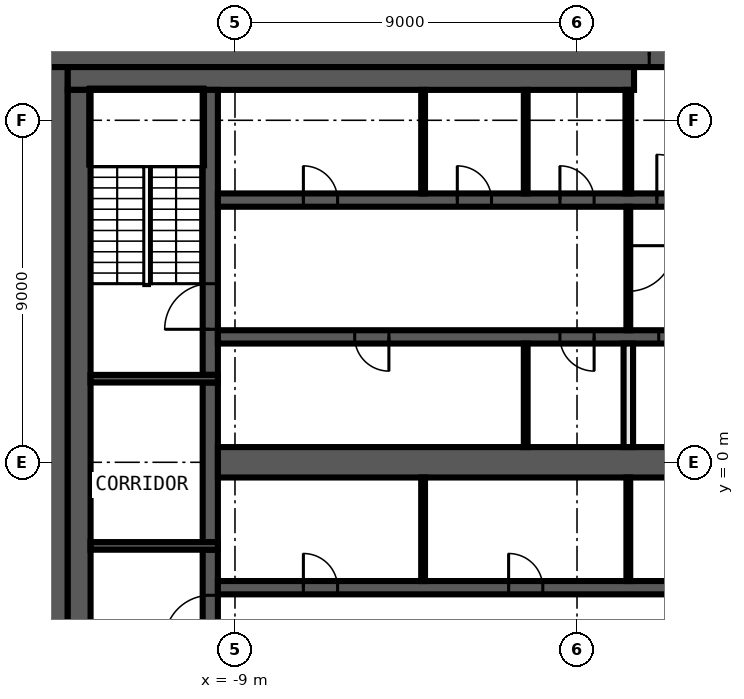
"""IFC4 building model, lengths in metres.
Left out: names, types, materials, properties, quantities, classifications, styles, units other than length and angle.
Written with IfcOpenShell. Run it as: python <this file> out.ifc"""

import sys

from ifc_helpers import new_model, si_unit, direction, frame, frame_2d, origin, place, context, subcontext, project, spatial, rectangle, extrude, element, fill, save


model = new_model("IFC4")
c1 = context("Model", 3, precision=1e-05, world=origin(), true_north=direction((0.0, 1.0)))
c2 = subcontext(c1, "Body", "Model", "MODEL_VIEW")
j1 = project(units=[si_unit("LENGTHUNIT", "METRE"), si_unit("PLANEANGLEUNIT", "RADIAN")], contexts=[c1])
p1 = place(None, origin())
s1 = spatial("IfcSite", under=j1, at=p1, CompositionType="ELEMENT")
p2 = place(p1, origin())
s2 = spatial("IfcBuilding", under=s1, at=p2, CompositionType="ELEMENT")
p3 = place(p2, frame((0.0, 0.0, 327.8)))
s3 = spatial("IfcBuildingStorey", under=s2, at=p3, CompositionType="ELEMENT", Elevation=327.8)
p4 = place(p3, frame((-14.0, 10.7, 0.0), z_axis=(0.0, 0.0, 1.0), x_axis=(1.0, 0.0, 0.0)))
e1 = element("IfcWall", 1, at=p4, inside=s3, PredefinedType="SHEAR", context=c2, shape_type="SweptSolid", body=[
    extrude(rectangle(XDim=28.0, YDim=0.6, at=frame_2d((14.0, 0.0))), origin(), (0.0, 0.0, 1.0), 3.82),
])
p5 = place(p4, frame((15.9, 0.0, 0.0)))
e2 = element("IfcOpeningElement", 2, at=p5, cuts=e1, PredefinedType="OPENING", context=c2, shape_type="SweptSolid", body=[
    extrude(rectangle(XDim=1.6, YDim=2.1, at=frame_2d((0.8, 1.05))), frame((0.0, 0.31, 0.0), z_axis=(0.0, -1.0, 0.0), x_axis=(1.0, 0.0, 0.0)), (0.0, 0.0, 1.0), 0.62),
])
p6 = place(p3, frame((-13.7, -10.4, 0.0), z_axis=(0.0, 0.0, 1.0), x_axis=(0.0, 1.0, 0.0)))
e3 = element("IfcWall", 3, at=p6, inside=s3, PredefinedType="SHEAR", context=c2, shape_type="SweptSolid", body=[
    extrude(rectangle(XDim=20.8, YDim=0.6, at=frame_2d((10.4, 0.0))), origin(), (0.0, 0.0, 1.0), 3.82),
])
p7 = place(p3, frame((-13.4, 10.1, 0.0), z_axis=(0.0, 0.0, 1.0), x_axis=(1.0, 0.0, 0.0)))
e4 = element("IfcWall", 4, at=p7, inside=s3, PredefinedType="SHEAR", context=c2, shape_type="SweptSolid", body=[
    extrude(rectangle(XDim=14.9, YDim=0.6, at=frame_2d((7.45, 0.0))), origin(), (0.0, 0.0, 1.0), 3.82),
])
p8 = place(p3, frame((-13.1, -9.8, 0.0), z_axis=(0.0, 0.0, 1.0), x_axis=(0.0, 1.0, 0.0)))
e5 = element("IfcWall", 5, at=p8, inside=s3, PredefinedType="SHEAR", context=c2, shape_type="SweptSolid", body=[
    extrude(rectangle(XDim=19.6, YDim=0.6, at=frame_2d((9.8, 0.0))), origin(), (0.0, 0.0, 1.0), 3.82),
])
p9 = place(p3, frame((-9.65, -9.8, 0.0), z_axis=(0.0, 0.0, 1.0), x_axis=(0.0, 1.0, 0.0)))
e6 = element("IfcWall", 6, at=p9, inside=s3, PredefinedType="SHEAR", context=c2, shape_type="SweptSolid", body=[
    extrude(rectangle(XDim=7.5, YDim=0.4, at=frame_2d((3.75, 0.0))), origin(), (0.0, 0.0, 1.0), 3.82),
])
p10 = place(p9, frame((5.1, 0.0, 0.0)))
e7 = element("IfcOpeningElement", 7, at=p10, cuts=e6, PredefinedType="OPENING", context=c2, shape_type="SweptSolid", body=[
    extrude(rectangle(XDim=1.2, YDim=2.1, at=frame_2d((0.6, 1.05))), frame((0.0, 0.21, 0.0), z_axis=(0.0, -1.0, 0.0), x_axis=(1.0, 0.0, 0.0)), (0.0, 0.0, 1.0), 0.42),
])
p11 = place(p3, frame((-9.65, -2.1, 0.0), z_axis=(0.0, 0.0, 1.0), x_axis=(0.0, 1.0, 0.0)))
e8 = element("IfcWall", 8, at=p11, inside=s3, PredefinedType="SHEAR", context=c2, shape_type="SweptSolid", body=[
    extrude(rectangle(XDim=4.2, YDim=0.4, at=frame_2d((2.1, 0.0))), origin(), (0.0, 0.0, 1.0), 3.82),
])
p12 = place(p3, frame((-9.65, 2.3, 0.0), z_axis=(0.0, 0.0, 1.0), x_axis=(0.0, 1.0, 0.0)))
e9 = element("IfcWall", 9, at=p12, inside=s3, PredefinedType="SHEAR", context=c2, shape_type="SweptSolid", body=[
    extrude(rectangle(XDim=7.5, YDim=0.4, at=frame_2d((3.75, 0.0))), origin(), (0.0, 0.0, 1.0), 3.82),
])
p13 = place(p12, frame((1.2, 0.0, 0.0)))
e10 = element("IfcOpeningElement", 10, at=p13, cuts=e9, PredefinedType="OPENING", context=c2, shape_type="SweptSolid", body=[
    extrude(rectangle(XDim=1.2, YDim=2.1, at=frame_2d((0.6, 1.05))), frame((0.0, 0.21, 0.0), z_axis=(0.0, -1.0, 0.0), x_axis=(1.0, 0.0, 0.0)), (0.0, 0.0, 1.0), 0.42),
])
for number, where, z_axis, x_axis in (
    (11, (-9.45, 2.2, 0.0), (0.0, 0.0, 1.0), (-1.0, 0.0, 0.0)),
    (12, (-9.45, -2.2, 0.0), (0.0, 0.0, 1.0), (-1.0, 0.0, 0.0)),
):
    element("IfcWall", number, at=place(p3, frame(where, z_axis=z_axis, x_axis=x_axis)), inside=s3, PredefinedType="SHEAR", context=c2, shape_type="SweptSolid", body=[
        extrude(rectangle(XDim=3.35, YDim=0.2, at=frame_2d((1.675, 0.0))), origin(), (0.0, 0.0, 1.0), 3.82),
    ])
p14 = place(p3, frame((-9.45, 6.9, 0.0), z_axis=(0.0, 0.0, 1.0), x_axis=(1.0, 0.0, 0.0)))
e13 = element("IfcWall", 13, at=p14, inside=s3, PredefinedType="SHEAR", context=c2, shape_type="SweptSolid", body=[
    extrude(rectangle(XDim=18.9, YDim=0.35, at=frame_2d((9.45, 0.0))), origin(), (0.0, 0.0, 1.0), 3.82),
])
p15 = place(p14, frame((11.55, 0.0, 0.0)))
e14 = element("IfcOpeningElement", 14, at=p15, cuts=e13, PredefinedType="OPENING", context=c2, shape_type="SweptSolid", body=[
    extrude(rectangle(XDim=1.2, YDim=2.1, at=frame_2d((0.6, 1.05))), frame((0.0, 0.185, 0.0), z_axis=(0.0, -1.0, 0.0), x_axis=(1.0, 0.0, 0.0)), (0.0, 0.0, 1.0), 0.37),
])
p16 = place(p14, frame((14.3, 0.0, 0.0)))
e15 = element("IfcOpeningElement", 15, at=p16, cuts=e13, PredefinedType="OPENING", context=c2, shape_type="SweptSolid", body=[
    extrude(rectangle(XDim=1.1, YDim=2.1, at=frame_2d((0.55, 1.05))), frame((0.0, 0.185, 0.0), z_axis=(0.0, -1.0, 0.0), x_axis=(1.0, 0.0, 0.0)), (0.0, 0.0, 1.0), 0.37),
])
p17 = place(p14, frame((17.0, 0.0, 0.0)))
e16 = element("IfcOpeningElement", 16, at=p17, cuts=e13, PredefinedType="OPENING", context=c2, shape_type="SweptSolid", body=[
    extrude(rectangle(XDim=1.1, YDim=2.1, at=frame_2d((0.55, 1.05))), frame((0.0, 0.185, 0.0), z_axis=(0.0, -1.0, 0.0), x_axis=(1.0, 0.0, 0.0)), (0.0, 0.0, 1.0), 0.37),
])
p18 = place(p14, frame((2.25, 0.0, 0.0)))
e17 = element("IfcOpeningElement", 17, at=p18, cuts=e13, PredefinedType="OPENING", context=c2, shape_type="SweptSolid", body=[
    extrude(rectangle(XDim=0.9, YDim=2.1, at=frame_2d((0.45, 1.05))), frame((0.0, 0.185, 0.0), z_axis=(0.0, -1.0, 0.0), x_axis=(1.0, 0.0, 0.0)), (0.0, 0.0, 1.0), 0.37),
])
p19 = place(p14, frame((6.3, 0.0, 0.0)))
e18 = element("IfcOpeningElement", 18, at=p19, cuts=e13, PredefinedType="OPENING", context=c2, shape_type="SweptSolid", body=[
    extrude(rectangle(XDim=0.9, YDim=2.1, at=frame_2d((0.45, 1.05))), frame((0.0, 0.185, 0.0), z_axis=(0.0, -1.0, 0.0), x_axis=(1.0, 0.0, 0.0)), (0.0, 0.0, 1.0), 0.37),
])
p20 = place(p14, frame((9.0, 0.0, 0.0)))
e19 = element("IfcOpeningElement", 19, at=p20, cuts=e13, PredefinedType="OPENING", context=c2, shape_type="SweptSolid", body=[
    extrude(rectangle(XDim=0.9, YDim=2.1, at=frame_2d((0.45, 1.05))), frame((0.0, 0.185, 0.0), z_axis=(0.0, -1.0, 0.0), x_axis=(1.0, 0.0, 0.0)), (0.0, 0.0, 1.0), 0.37),
])
p21 = place(p3, frame((9.45, 3.3, 0.0), z_axis=(0.0, 0.0, 1.0), x_axis=(-1.0, 0.0, 0.0)))
e20 = element("IfcWall", 20, at=p21, inside=s3, PredefinedType="SHEAR", context=c2, shape_type="SweptSolid", body=[
    extrude(rectangle(XDim=18.9, YDim=0.35, at=frame_2d((9.45, 0.0))), origin(), (0.0, 0.0, 1.0), 3.82),
])
p22 = place(p21, frame((6.2, 0.0, 0.0)))
e21 = element("IfcOpeningElement", 21, at=p22, cuts=e20, PredefinedType="OPENING", context=c2, shape_type="SweptSolid", body=[
    extrude(rectangle(XDim=1.1, YDim=2.1, at=frame_2d((0.55, 1.05))), frame((0.0, 0.185, 0.0), z_axis=(0.0, -1.0, 0.0), x_axis=(1.0, 0.0, 0.0)), (0.0, 0.0, 1.0), 0.37),
])
p23 = place(p21, frame((3.5, 0.0, 0.0)))
e22 = element("IfcOpeningElement", 22, at=p23, cuts=e20, PredefinedType="OPENING", context=c2, shape_type="SweptSolid", body=[
    extrude(rectangle(XDim=1.1, YDim=2.1, at=frame_2d((0.55, 1.05))), frame((0.0, 0.185, 0.0), z_axis=(0.0, -1.0, 0.0), x_axis=(1.0, 0.0, 0.0)), (0.0, 0.0, 1.0), 0.37),
])
p24 = place(p21, frame((0.9, 0.0, 0.0)))
e23 = element("IfcOpeningElement", 23, at=p24, cuts=e20, PredefinedType="OPENING", context=c2, shape_type="SweptSolid", body=[
    extrude(rectangle(XDim=0.9, YDim=2.1, at=frame_2d((0.45, 1.05))), frame((0.0, 0.185, 0.0), z_axis=(0.0, -1.0, 0.0), x_axis=(1.0, 0.0, 0.0)), (0.0, 0.0, 1.0), 0.37),
])
p25 = place(p21, frame((14.4, 0.0, 0.0)))
e24 = element("IfcOpeningElement", 24, at=p25, cuts=e20, PredefinedType="OPENING", context=c2, shape_type="SweptSolid", body=[
    extrude(rectangle(XDim=0.9, YDim=2.1, at=frame_2d((0.45, 1.05))), frame((0.0, 0.185, 0.0), z_axis=(0.0, -1.0, 0.0), x_axis=(1.0, 0.0, 0.0)), (0.0, 0.0, 1.0), 0.37),
])
p26 = place(p21, frame((9.0, 0.0, 0.0)))
e25 = element("IfcOpeningElement", 25, at=p26, cuts=e20, PredefinedType="OPENING", context=c2, shape_type="SweptSolid", body=[
    extrude(rectangle(XDim=0.9, YDim=2.1, at=frame_2d((0.45, 1.05))), frame((0.0, 0.185, 0.0), z_axis=(0.0, -1.0, 0.0), x_axis=(1.0, 0.0, 0.0)), (0.0, 0.0, 1.0), 0.37),
])
p27 = place(p3, frame((-9.45, -3.3, 0.0), z_axis=(0.0, 0.0, 1.0), x_axis=(1.0, 0.0, 0.0)))
e26 = element("IfcWall", 26, at=p27, inside=s3, PredefinedType="SHEAR", context=c2, shape_type="SweptSolid", body=[
    extrude(rectangle(XDim=18.9, YDim=0.35, at=frame_2d((9.45, 0.0))), origin(), (0.0, 0.0, 1.0), 3.82),
])
p28 = place(p27, frame((17.0, 0.0, 0.0)))
e27 = element("IfcOpeningElement", 27, at=p28, cuts=e26, PredefinedType="OPENING", context=c2, shape_type="SweptSolid", body=[
    extrude(rectangle(XDim=1.1, YDim=2.1, at=frame_2d((0.55, 1.05))), frame((0.0, 0.185, 0.0), z_axis=(0.0, -1.0, 0.0), x_axis=(1.0, 0.0, 0.0)), (0.0, 0.0, 1.0), 0.37),
])
p29 = place(p27, frame((2.25, 0.0, 0.0)))
e28 = element("IfcOpeningElement", 28, at=p29, cuts=e26, PredefinedType="OPENING", context=c2, shape_type="SweptSolid", body=[
    extrude(rectangle(XDim=0.9, YDim=2.1, at=frame_2d((0.45, 1.05))), frame((0.0, 0.185, 0.0), z_axis=(0.0, -1.0, 0.0), x_axis=(1.0, 0.0, 0.0)), (0.0, 0.0, 1.0), 0.37),
])
p30 = place(p27, frame((7.65, 0.0, 0.0)))
e29 = element("IfcOpeningElement", 29, at=p30, cuts=e26, PredefinedType="OPENING", context=c2, shape_type="SweptSolid", body=[
    extrude(rectangle(XDim=0.9, YDim=2.1, at=frame_2d((0.45, 1.05))), frame((0.0, 0.185, 0.0), z_axis=(0.0, -1.0, 0.0), x_axis=(1.0, 0.0, 0.0)), (0.0, 0.0, 1.0), 0.37),
])
p31 = place(p27, frame((13.05, 0.0, 0.0)))
e30 = element("IfcOpeningElement", 30, at=p31, cuts=e26, PredefinedType="OPENING", context=c2, shape_type="SweptSolid", body=[
    extrude(rectangle(XDim=0.9, YDim=2.1, at=frame_2d((0.45, 1.05))), frame((0.0, 0.185, 0.0), z_axis=(0.0, -1.0, 0.0), x_axis=(1.0, 0.0, 0.0)), (0.0, 0.0, 1.0), 0.37),
])
p32 = place(p3, frame((-9.45, 0.0, 0.0), z_axis=(0.0, 0.0, 1.0), x_axis=(1.0, 0.0, 0.0)))
e31 = element("IfcWall", 31, at=p32, inside=s3, PredefinedType="SHEAR", context=c2, shape_type="SweptSolid", body=[
    extrude(rectangle(XDim=18.9, YDim=0.8, at=frame_2d((9.45, 0.0))), origin(), (0.0, 0.0, 1.0), 3.82),
])
p33 = place(p3, frame((1.35, 7.075, 0.0), z_axis=(0.0, 0.0, 1.0), x_axis=(0.0, 1.0, 0.0)))
e32 = element("IfcWall", 32, at=p33, inside=s3, PredefinedType="PARTITIONING", context=c2, shape_type="SweptSolid", body=[
    extrude(rectangle(XDim=2.725, YDim=0.15, at=frame_2d((1.363, 0.0))), origin(), (0.0, 0.0, 1.0), 3.82),
])
p34 = place(p3, frame((1.35, -3.125, 0.0), z_axis=(0.0, 0.0, 1.0), x_axis=(0.0, 1.0, 0.0)))
e33 = element("IfcWall", 33, at=p34, inside=s3, PredefinedType="PARTITIONING", context=c2, shape_type="SweptSolid", body=[
    extrude(rectangle(XDim=2.725, YDim=0.1, at=frame_2d((1.363, 0.0))), origin(), (0.0, 0.0, 1.0), 3.82),
])
p35 = place(p3, frame((1.35, 6.725, 0.0), z_axis=(0.0, 0.0, 1.0), x_axis=(0.0, -1.0, 0.0)))
e34 = element("IfcWall", 34, at=p35, inside=s3, PredefinedType="PARTITIONING", context=c2, shape_type="SweptSolid", body=[
    extrude(rectangle(XDim=3.25, YDim=0.1, at=frame_2d((1.625, 0.0))), origin(), (0.0, 0.0, 1.0), 3.82),
])
p36 = place(p35, frame((1.025, 0.0, 0.0)))
e35 = element("IfcOpeningElement", 35, at=p36, cuts=e34, PredefinedType="OPENING", context=c2, shape_type="SweptSolid", body=[
    extrude(rectangle(XDim=1.2, YDim=2.1, at=frame_2d((0.6, 1.05))), frame((0.0, 0.06, 0.0), z_axis=(0.0, -1.0, 0.0), x_axis=(1.0, 0.0, 0.0)), (0.0, 0.0, 1.0), 0.12),
])
p37 = place(p3, frame((1.35, 0.4, 0.0), z_axis=(0.0, 0.0, 1.0), x_axis=(0.0, 1.0, 0.0)))
e36 = element("IfcWall", 36, at=p37, inside=s3, PredefinedType="SOLIDWALL", context=c2, shape_type="SweptSolid", body=[
    extrude(rectangle(XDim=2.725, YDim=0.25, at=frame_2d((1.363, 0.0))), origin(), (0.0, 0.0, 1.0), 3.82),
])
for number, where, z_axis, x_axis in (
    (37, (-1.35, 0.4, 0.0), (0.0, 0.0, 1.0), (0.0, 1.0, 0.0)),
    (38, (-1.35, 7.075, 0.0), (0.0, 0.0, 1.0), (0.0, 1.0, 0.0)),
    (39, (-4.05, -3.125, 0.0), (0.0, 0.0, 1.0), (0.0, 1.0, 0.0)),
    (40, (-4.05, 7.075, 0.0), (0.0, 0.0, 1.0), (0.0, 1.0, 0.0)),
):
    element("IfcWall", number, at=place(p3, frame(where, z_axis=z_axis, x_axis=x_axis)), inside=s3, PredefinedType="PARTITIONING", context=c2, shape_type="SweptSolid", body=[
        extrude(rectangle(XDim=2.725, YDim=0.1, at=frame_2d((1.363, 0.0))), origin(), (0.0, 0.0, 1.0), 3.82),
    ])
p38 = place(p5, origin())
e41 = element("IfcDoor", 41, at=p38, inside=s3, OperationType="DOUBLE_DOOR_SINGLE_SWING", PredefinedType="DOOR", context=c2, shape_type="SweptSolid", body=[
    extrude(rectangle(XDim=1.6, YDim=2.1, at=frame_2d((0.8, 1.05))), frame((0.0, 0.025, 0.0), z_axis=(0.0, -1.0, 0.0), x_axis=(1.0, 0.0, 0.0)), (0.0, 0.0, 1.0), 0.05),
])
fill(e2, e41)
p39 = place(p15, origin())
e42 = element("IfcDoor", 42, at=p39, inside=s3, OperationType="SINGLE_SWING_LEFT", PredefinedType="DOOR", context=c2, shape_type="SweptSolid", body=[
    extrude(rectangle(XDim=1.2, YDim=2.1, at=frame_2d((0.6, 1.05))), frame((0.0, 0.025, 0.0), z_axis=(0.0, -1.0, 0.0), x_axis=(1.0, 0.0, 0.0)), (0.0, 0.0, 1.0), 0.05),
])
fill(e14, e42)
p40 = place(p22, origin())
e43 = element("IfcDoor", 43, at=p40, inside=s3, OperationType="DOUBLE_DOOR_SLIDING", PredefinedType="DOOR", context=c2, shape_type="SweptSolid", body=[
    extrude(rectangle(XDim=1.1, YDim=2.1, at=frame_2d((0.55, 1.05))), frame((0.0, 0.025, 0.0), z_axis=(0.0, -1.0, 0.0), x_axis=(1.0, 0.0, 0.0)), (0.0, 0.0, 1.0), 0.05),
])
fill(e21, e43)
p41 = place(p18, origin())
e44 = element("IfcDoor", 44, at=p41, inside=s3, OperationType="SINGLE_SWING_RIGHT", PredefinedType="DOOR", context=c2, shape_type="SweptSolid", body=[
    extrude(rectangle(XDim=0.9, YDim=2.1, at=frame_2d((0.45, 1.05))), frame((0.0, 0.025, 0.0), z_axis=(0.0, -1.0, 0.0), x_axis=(1.0, 0.0, 0.0)), (0.0, 0.0, 1.0), 0.05),
])
fill(e17, e44)
p42 = place(p19, origin())
e45 = element("IfcDoor", 45, at=p42, inside=s3, OperationType="SINGLE_SWING_LEFT", PredefinedType="DOOR", context=c2, shape_type="SweptSolid", body=[
    extrude(rectangle(XDim=0.9, YDim=2.1, at=frame_2d((0.45, 1.05))), frame((0.0, 0.025, 0.0), z_axis=(0.0, -1.0, 0.0), x_axis=(1.0, 0.0, 0.0)), (0.0, 0.0, 1.0), 0.05),
])
fill(e18, e45)
p43 = place(p20, origin())
e46 = element("IfcDoor", 46, at=p43, inside=s3, OperationType="SINGLE_SWING_RIGHT", PredefinedType="DOOR", context=c2, shape_type="SweptSolid", body=[
    extrude(rectangle(XDim=0.9, YDim=2.1, at=frame_2d((0.45, 1.05))), frame((0.0, 0.025, 0.0), z_axis=(0.0, -1.0, 0.0), x_axis=(1.0, 0.0, 0.0)), (0.0, 0.0, 1.0), 0.05),
])
fill(e19, e46)
p44 = place(p25, origin())
e47 = element("IfcDoor", 47, at=p44, inside=s3, OperationType="SINGLE_SWING_LEFT", PredefinedType="DOOR", context=c2, shape_type="SweptSolid", body=[
    extrude(rectangle(XDim=0.9, YDim=2.1, at=frame_2d((0.45, 1.05))), frame((0.0, 0.025, 0.0), z_axis=(0.0, -1.0, 0.0), x_axis=(1.0, 0.0, 0.0)), (0.0, 0.0, 1.0), 0.05),
])
fill(e24, e47)
p45 = place(p26, origin())
e48 = element("IfcDoor", 48, at=p45, inside=s3, OperationType="SINGLE_SWING_RIGHT", PredefinedType="DOOR", context=c2, shape_type="SweptSolid", body=[
    extrude(rectangle(XDim=0.9, YDim=2.1, at=frame_2d((0.45, 1.05))), frame((0.0, 0.025, 0.0), z_axis=(0.0, -1.0, 0.0), x_axis=(1.0, 0.0, 0.0)), (0.0, 0.0, 1.0), 0.05),
])
fill(e25, e48)
p46 = place(p29, origin())
e49 = element("IfcDoor", 49, at=p46, inside=s3, OperationType="SINGLE_SWING_LEFT", PredefinedType="DOOR", context=c2, shape_type="SweptSolid", body=[
    extrude(rectangle(XDim=0.9, YDim=2.1, at=frame_2d((0.45, 1.05))), frame((0.0, 0.025, 0.0), z_axis=(0.0, -1.0, 0.0), x_axis=(1.0, 0.0, 0.0)), (0.0, 0.0, 1.0), 0.05),
])
fill(e28, e49)
p47 = place(p30, origin())
e50 = element("IfcDoor", 50, at=p47, inside=s3, OperationType="SINGLE_SWING_RIGHT", PredefinedType="DOOR", context=c2, shape_type="SweptSolid", body=[
    extrude(rectangle(XDim=0.9, YDim=2.1, at=frame_2d((0.45, 1.05))), frame((0.0, 0.025, 0.0), z_axis=(0.0, -1.0, 0.0), x_axis=(1.0, 0.0, 0.0)), (0.0, 0.0, 1.0), 0.05),
])
fill(e29, e50)
p48 = place(p13, origin())
e51 = element("IfcDoor", 51, at=p48, inside=s3, OperationType="SINGLE_SWING_RIGHT", PredefinedType="DOOR", context=c2, shape_type="SweptSolid", body=[
    extrude(rectangle(XDim=1.2, YDim=2.1, at=frame_2d((0.6, 1.05))), frame((0.0, 0.025, 0.0), z_axis=(0.0, -1.0, 0.0), x_axis=(1.0, 0.0, 0.0)), (0.0, 0.0, 1.0), 0.05),
])
fill(e10, e51)
p49 = place(p10, origin())
e52 = element("IfcDoor", 52, at=p49, inside=s3, OperationType="SINGLE_SWING_LEFT", PredefinedType="DOOR", context=c2, shape_type="SweptSolid", body=[
    extrude(rectangle(XDim=1.2, YDim=2.1, at=frame_2d((0.6, 1.05))), frame((0.0, 0.025, 0.0), z_axis=(0.0, -1.0, 0.0), x_axis=(1.0, 0.0, 0.0)), (0.0, 0.0, 1.0), 0.05),
])
fill(e7, e52)
p50 = place(p36, origin())
e53 = element("IfcDoor", 53, at=p50, inside=s3, OperationType="SINGLE_SWING_LEFT", PredefinedType="DOOR", context=c2, shape_type="SweptSolid", body=[
    extrude(rectangle(XDim=1.2, YDim=2.1, at=frame_2d((0.6, 1.05))), frame((0.0, 0.025, 0.0), z_axis=(0.0, -1.0, 0.0), x_axis=(1.0, 0.0, 0.0)), (0.0, 0.0, 1.0), 0.05),
])
fill(e35, e53)
save(model, sys.argv[1])
